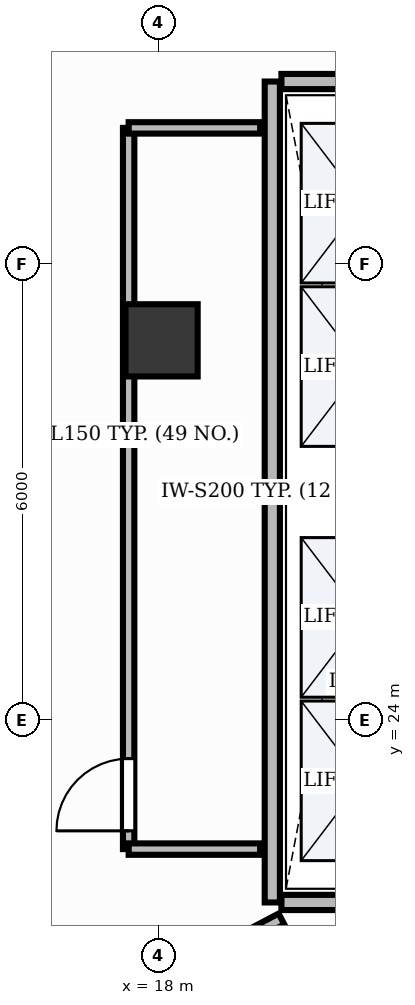
"""IFC4 building model, lengths in metres.
Left out: names, types, materials, properties, quantities, classifications, styles, units other than length and angle.
Written with IfcOpenShell. Run it as: python <this file> out.ifc"""

import sys

from ifc_helpers import new_model, si_unit, direction, frame, frame_2d, origin, origin_2d, place, context, subcontext, project, spatial, rectangle, extrude, element, fill, save


model = new_model("IFC4")
c1 = context("Model", 3, precision=1e-05, world=origin(), true_north=direction((0.0, 1.0)))
c2 = subcontext(c1, "Body", "Model", "MODEL_VIEW")
j1 = project(units=[si_unit("LENGTHUNIT", "METRE"), si_unit("PLANEANGLEUNIT", "RADIAN")], contexts=[c1])
p1 = place(None, origin())
s1 = spatial("IfcSite", under=j1, at=p1, CompositionType="ELEMENT")
p2 = place(p1, origin())
s2 = spatial("IfcBuilding", under=s1, at=p2, CompositionType="ELEMENT")
p3 = place(p2, frame((0.0, 0.0, 200.4)))
s3 = spatial("IfcBuildingStorey", under=s2, at=p3, CompositionType="ELEMENT", Elevation=200.4)
p4 = place(p3, frame((18.043, 28.995, -0.0), z_axis=(0.0, 0.0, 1.0), x_axis=(1.0, 0.0, 0.0)))
e1 = element("IfcColumn", 1, at=p4, inside=s3, PredefinedType="COLUMN", context=c2, shape_type="SweptSolid", body=[
    extrude(rectangle(XDim=0.95, YDim=0.95, at=origin_2d()), origin(), (0.0, 0.0, 1.0), 3.901),
])
p5 = place(p3, frame((19.5, 21.6, 0.0), z_axis=(0.0, 0.0, 1.0), x_axis=(0.0, 1.0, 0.0)))
e2 = element("IfcWall", 2, at=p5, inside=s3, PredefinedType="PARTITIONING", context=c2, shape_type="SweptSolid", body=[
    extrude(rectangle(XDim=10.8, YDim=0.2, at=frame_2d((5.4, 0.0))), origin(), (0.0, 0.0, 1.0), 2.91),
])
for number, where, z_axis, x_axis in (
    (3, (19.62, 21.6, 0.0), (0.0, 0.0, 1.0), (1.0, 0.0, 0.0)),
    (4, (19.62, 32.4, 0.0), (0.0, 0.0, 1.0), (1.0, 0.0, 0.0)),
):
    element("IfcWall", number, at=place(p3, frame(where, z_axis=z_axis, x_axis=x_axis)), inside=s3, PredefinedType="PARTITIONING", context=c2, shape_type="SweptSolid", body=[
        extrude(rectangle(XDim=2.11, YDim=0.2, at=frame_2d((1.055, 0.0))), origin(), (0.0, 0.0, 1.0), 2.91),
    ])
p6 = place(p3, frame((17.61, 22.302, 0.0), z_axis=(0.0, 0.0, 1.0), x_axis=(0.0, 1.0, 0.0)))
e5 = element("IfcWall", 5, at=p6, inside=s3, PredefinedType="PARTITIONING", context=c2, shape_type="SweptSolid", body=[
    extrude(rectangle(XDim=9.488, YDim=0.15, at=frame_2d((4.744, 0.0))), origin(), (0.0, 0.0, 1.0), 2.91),
])
p7 = place(p6, frame((0.24, 0.0, 0.0)))
e6 = element("IfcOpeningElement", 6, at=p7, cuts=e5, PredefinedType="OPENING", context=c2, shape_type="SweptSolid", body=[
    extrude(rectangle(XDim=0.95, YDim=2.15, at=frame_2d((0.475, 1.075))), frame((0.0, 0.09, 0.0), z_axis=(0.0, -1.0, 0.0), x_axis=(1.0, 0.0, 0.0)), (0.0, 0.0, 1.0), 0.18),
])
p8 = place(p3, frame((17.61, 20.322, 0.0), z_axis=(0.0, 0.0, 1.0), x_axis=(0.884437714556, 0.466658257261, 0.0)))
e7 = element("IfcWall", 7, at=p8, inside=s3, PredefinedType="PARTITIONING", context=c2, shape_type="SweptSolid", body=[
    extrude(rectangle(XDim=2.273, YDim=0.16, at=frame_2d((1.136, 0.0))), origin(), (0.0, 0.0, 1.0), 2.91),
])
p9 = place(p3, frame((19.34, 22.302, 0.0), z_axis=(0.0, 0.0, 1.0), x_axis=(-1.0, 0.0, 0.0)))
e8 = element("IfcWall", 8, at=p9, inside=s3, PredefinedType="PARTITIONING", context=c2, shape_type="SweptSolid", body=[
    extrude(rectangle(XDim=1.73, YDim=0.15, at=frame_2d((0.865, 0.0))), origin(), (0.0, 0.0, 1.0), 2.91),
])
p10 = place(p3, frame((17.61, 31.79, 0.0), z_axis=(0.0, 0.0, 1.0), x_axis=(1.0, 0.0, 0.0)))
e9 = element("IfcWall", 9, at=p10, inside=s3, PredefinedType="PARTITIONING", context=c2, shape_type="SweptSolid", body=[
    extrude(rectangle(XDim=1.73, YDim=0.15, at=frame_2d((0.865, 0.0))), origin(), (0.0, 0.0, 1.0), 2.91),
])
p11 = place(p7, origin())
e10 = element("IfcDoor", 10, at=p11, inside=s3, OperationType="SINGLE_SWING_LEFT", PredefinedType="DOOR", context=c2, shape_type="SweptSolid", body=[
    extrude(rectangle(XDim=0.95, YDim=2.15, at=frame_2d((0.475, 1.075))), frame((0.0, 0.025, 0.0), z_axis=(0.0, -1.0, 0.0), x_axis=(1.0, 0.0, 0.0)), (0.0, 0.0, 1.0), 0.05),
])
fill(e6, e10)
save(model, sys.argv[1])
